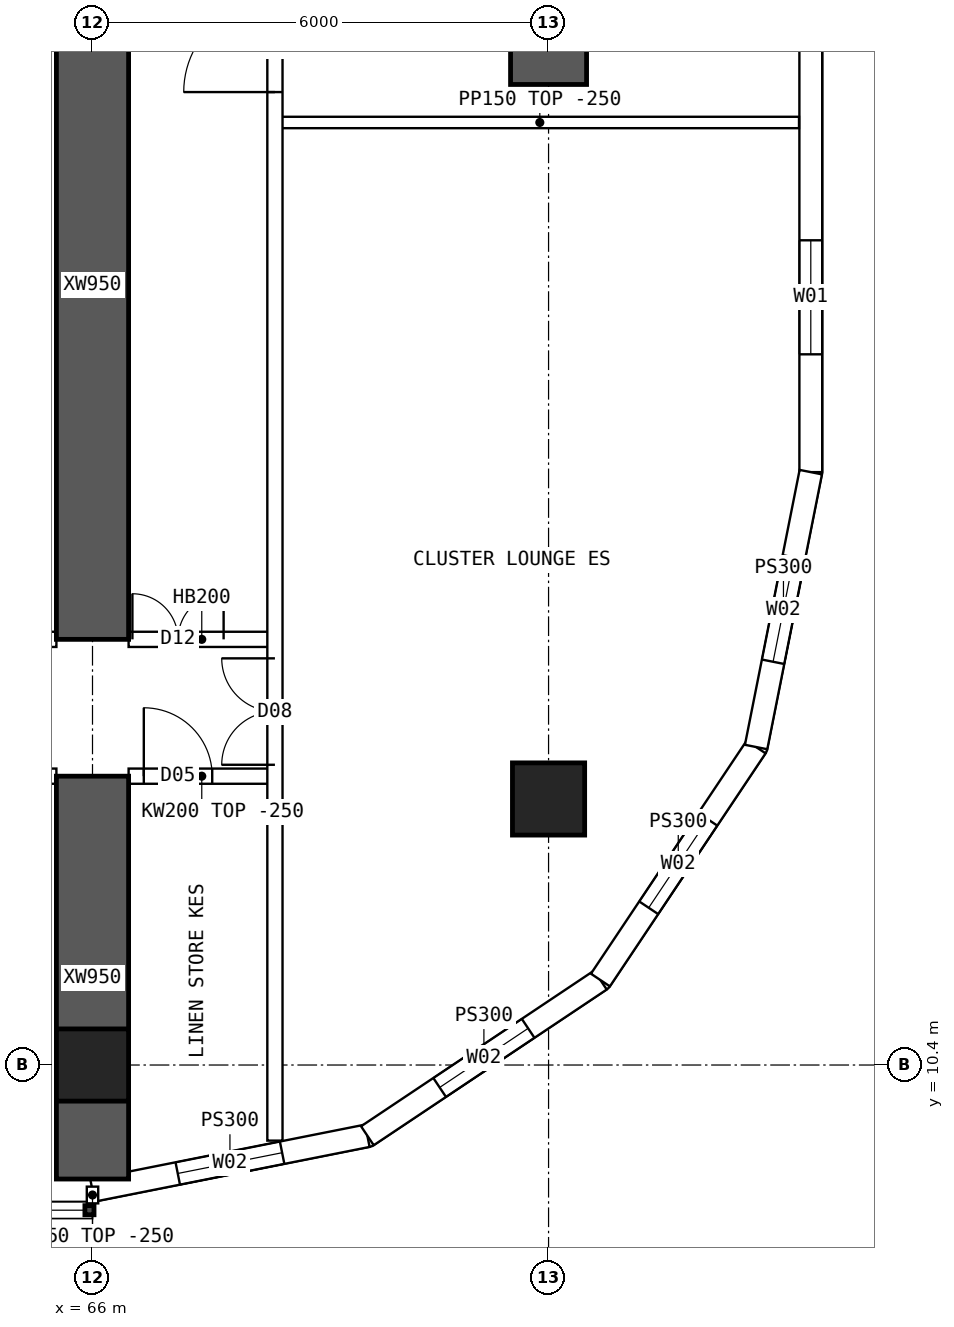
"""IFC4 building model, lengths in metres.
Left out: names, types, materials, properties, quantities, classifications, styles, units other than length and angle.
Written with IfcOpenShell. Run it as: python <this file> out.ifc"""

import sys

from ifc_helpers import new_model, si_unit, direction, frame, frame_2d, origin, origin_2d, place, context, subcontext, project, spatial, polyline, rectangle, hollow_rectangle, outline, extrude, element, fill, save


model = new_model("IFC4")
c1 = context("Model", 3, precision=1e-05, world=origin(), true_north=direction((0.0, 1.0)))
c2 = subcontext(c1, "Body", "Model", "MODEL_VIEW")
j1 = project(units=[si_unit("LENGTHUNIT", "METRE"), si_unit("PLANEANGLEUNIT", "RADIAN")], contexts=[c1])
p1 = place(None, origin())
s1 = spatial("IfcSite", under=j1, at=p1, CompositionType="ELEMENT")
p2 = place(p1, origin())
s2 = spatial("IfcBuilding", under=s1, at=p2, CompositionType="ELEMENT")
p3 = place(p2, frame((0.0, 0.0, 118.15)))
s3 = spatial("IfcBuildingStorey", under=s2, at=p3, CompositionType="ELEMENT", Elevation=118.15)
for number, where, z_axis, x_axis in (
    (1, (66.0, 10.4, 0.0), (0.0, 0.0, 1.0), (1.0, 0.0, 0.0)),
    (2, (72.0, 13.9, 0.0), (0.0, 0.0, 1.0), (1.0, 0.0, 0.0)),
):
    element("IfcColumn", number, at=place(p3, frame(where, z_axis=z_axis, x_axis=x_axis)), inside=s3, PredefinedType="COLUMN", context=c2, shape_type="SweptSolid", body=[
        extrude(hollow_rectangle(XDim=0.95, YDim=0.95, WallThickness=0.095, at=origin_2d()), origin(), (0.0, 0.0, 1.0), 3.75),
    ])
p4 = place(p3, frame((72.0, 23.3, 0.0), z_axis=(0.0, 0.0, 1.0), x_axis=(0.0, 1.0, 0.0)))
e3 = element("IfcWall", 3, at=p4, inside=s3, PredefinedType="SHEAR", context=c2, shape_type="SweptSolid", body=[
    extrude(rectangle(XDim=5.0, YDim=1.0, at=frame_2d((2.5, 0.0))), origin(), (0.0, 0.0, 1.0), 3.75),
])
p5 = place(p3, frame((66.0, 8.9, 0.0), z_axis=(0.0, 0.0, 1.0), x_axis=(0.0, 1.0, 0.0)))
e4 = element("IfcWall", 4, at=p5, inside=s3, PredefinedType="SHEAR", context=c2, shape_type="SweptSolid", body=[
    extrude(rectangle(XDim=5.3, YDim=0.95, at=frame_2d((2.65, 0.0))), origin(), (0.0, 0.0, 1.0), 3.75),
])
p6 = place(p3, frame((66.0, 16.0, 0.0), z_axis=(0.0, 0.0, 1.0), x_axis=(0.0, 1.0, 0.0)))
e5 = element("IfcWall", 5, at=p6, inside=s3, PredefinedType="SHEAR", context=c2, shape_type="SweptSolid", body=[
    extrude(rectangle(XDim=9.325, YDim=0.95, at=frame_2d((4.663, 0.0))), origin(), (0.0, 0.0, 1.0), 3.75),
])
p7 = place(p3, frame((75.45, 18.2, 0.0), z_axis=(0.0, 0.0, 1.0), x_axis=(0.0, 1.0, 0.0)))
e6 = element("IfcWall", 6, at=p7, inside=s3, PredefinedType="SOLIDWALL", context=c2, shape_type="SweptSolid", body=[
    extrude(outline(polyline([(-0.015, -0.15), (27.615, -0.15), (27.585, 0.15), (0.015, 0.15), (-0.015, -0.15)])), origin(), (0.0, 0.0, 1.0), 3.5),
])
p8 = place(p7, frame((1.55, 0.0, 0.9)))
e7 = element("IfcOpeningElement", 7, at=p8, cuts=e6, PredefinedType="OPENING", context=c2, shape_type="SweptSolid", body=[
    extrude(rectangle(XDim=1.5, YDim=2.0, at=frame_2d((0.75, 1.0))), frame((0.0, 0.16, 0.0), z_axis=(0.0, -1.0, 0.0), x_axis=(1.0, 0.0, 0.0)), (0.0, 0.0, 1.0), 0.32),
])
p9 = place(p7, frame((6.15, 0.0, 0.9)))
e8 = element("IfcOpeningElement", 8, at=p9, cuts=e6, PredefinedType="OPENING", context=c2, shape_type="SweptSolid", body=[
    extrude(rectangle(XDim=1.5, YDim=2.0, at=frame_2d((0.75, 1.0))), frame((0.0, 0.16, 0.0), z_axis=(0.0, -1.0, 0.0), x_axis=(1.0, 0.0, 0.0)), (0.0, 0.0, 1.0), 0.32),
])
p10 = place(p7, frame((10.75, 0.0, 0.9)))
e9 = element("IfcOpeningElement", 9, at=p10, cuts=e6, PredefinedType="OPENING", context=c2, shape_type="SweptSolid", body=[
    extrude(rectangle(XDim=1.5, YDim=2.0, at=frame_2d((0.75, 1.0))), frame((0.0, 0.16, 0.0), z_axis=(0.0, -1.0, 0.0), x_axis=(1.0, 0.0, 0.0)), (0.0, 0.0, 1.0), 0.32),
])
p11 = place(p7, frame((15.35, 0.0, 0.9)))
e10 = element("IfcOpeningElement", 10, at=p11, cuts=e6, PredefinedType="OPENING", context=c2, shape_type="SweptSolid", body=[
    extrude(rectangle(XDim=1.5, YDim=2.0, at=frame_2d((0.75, 1.0))), frame((0.0, 0.16, 0.0), z_axis=(0.0, -1.0, 0.0), x_axis=(1.0, 0.0, 0.0)), (0.0, 0.0, 1.0), 0.32),
])
p12 = place(p7, frame((19.95, 0.0, 0.9)))
e11 = element("IfcOpeningElement", 11, at=p12, cuts=e6, PredefinedType="OPENING", context=c2, shape_type="SweptSolid", body=[
    extrude(rectangle(XDim=1.5, YDim=2.0, at=frame_2d((0.75, 1.0))), frame((0.0, 0.16, 0.0), z_axis=(0.0, -1.0, 0.0), x_axis=(1.0, 0.0, 0.0)), (0.0, 0.0, 1.0), 0.32),
])
p13 = place(p7, frame((24.55, 0.0, 0.9)))
e12 = element("IfcOpeningElement", 12, at=p13, cuts=e6, PredefinedType="OPENING", context=c2, shape_type="SweptSolid", body=[
    extrude(rectangle(XDim=1.5, YDim=2.0, at=frame_2d((0.75, 1.0))), frame((0.0, 0.16, 0.0), z_axis=(0.0, -1.0, 0.0), x_axis=(1.0, 0.0, 0.0)), (0.0, 0.0, 1.0), 0.32),
])
p14 = place(p3, frame((66.0, 8.75, 0.0), z_axis=(0.0, 0.0, 1.0), x_axis=(0.980791473772, 0.195059183267, 0.0)))
e13 = element("IfcWall", 13, at=p14, inside=s3, PredefinedType="SOLIDWALL", context=c2, shape_type="SweptSolid", body=[
    extrude(outline(polyline([(-0.03, -0.15), (3.717, -0.15), (3.657, 0.15), (0.03, 0.15), (-0.03, -0.15)])), origin(), (0.0, 0.0, 1.0), 3.5),
])
p15 = place(p14, frame((1.144, 0.0, 0.9)))
e14 = element("IfcOpeningElement", 14, at=p15, cuts=e13, PredefinedType="OPENING", context=c2, shape_type="SweptSolid", body=[
    extrude(rectangle(XDim=1.4, YDim=1.8, at=frame_2d((0.7, 0.9))), frame((0.0, 0.16, 0.0), z_axis=(0.0, -1.0, 0.0), x_axis=(1.0, 0.0, 0.0)), (0.0, 0.0, 1.0), 0.32),
])
p16 = place(p3, frame((69.616, 9.469, 0.0), z_axis=(0.0, 0.0, 1.0), x_axis=(0.831448786846, 0.555601399253, 0.0)))
e15 = element("IfcWall", 15, at=p16, inside=s3, PredefinedType="SOLIDWALL", context=c2, shape_type="SweptSolid", body=[
    extrude(outline(polyline([(-0.03, -0.15), (3.717, -0.15), (3.657, 0.15), (0.03, 0.15), (-0.03, -0.15)])), origin(), (0.0, 0.0, 1.0), 3.5),
])
p17 = place(p16, frame((1.144, 0.0, 0.9)))
e16 = element("IfcOpeningElement", 16, at=p17, cuts=e15, PredefinedType="OPENING", context=c2, shape_type="SweptSolid", body=[
    extrude(rectangle(XDim=1.4, YDim=1.8, at=frame_2d((0.7, 0.9))), frame((0.0, 0.16, 0.0), z_axis=(0.0, -1.0, 0.0), x_axis=(1.0, 0.0, 0.0)), (0.0, 0.0, 1.0), 0.32),
])
p18 = place(p3, frame((72.682, 11.518, 0.0), z_axis=(0.0, 0.0, 1.0), x_axis=(0.555601399253, 0.831448786846, 0.0)))
e17 = element("IfcWall", 17, at=p18, inside=s3, PredefinedType="SOLIDWALL", context=c2, shape_type="SweptSolid", body=[
    extrude(outline(polyline([(-0.03, -0.15), (3.717, -0.15), (3.657, 0.15), (0.03, 0.15), (-0.03, -0.15)])), origin(), (0.0, 0.0, 1.0), 3.5),
])
p19 = place(p18, frame((1.144, 0.0, 0.9)))
e18 = element("IfcOpeningElement", 18, at=p19, cuts=e17, PredefinedType="OPENING", context=c2, shape_type="SweptSolid", body=[
    extrude(rectangle(XDim=1.4, YDim=1.8, at=frame_2d((0.7, 0.9))), frame((0.0, 0.16, 0.0), z_axis=(0.0, -1.0, 0.0), x_axis=(1.0, 0.0, 0.0)), (0.0, 0.0, 1.0), 0.32),
])
p20 = place(p3, frame((74.731, 14.583, 0.0), z_axis=(0.0, 0.0, 1.0), x_axis=(0.195059183267, 0.980791473772, 0.0)))
e19 = element("IfcWall", 19, at=p20, inside=s3, PredefinedType="SOLIDWALL", context=c2, shape_type="SweptSolid", body=[
    extrude(outline(polyline([(-0.03, -0.15), (3.702, -0.15), (3.672, 0.15), (0.03, 0.15), (-0.03, -0.15)])), origin(), (0.0, 0.0, 1.0), 3.5),
])
p21 = place(p20, frame((1.144, 0.0, 0.9)))
e20 = element("IfcOpeningElement", 20, at=p21, cuts=e19, PredefinedType="OPENING", context=c2, shape_type="SweptSolid", body=[
    extrude(rectangle(XDim=1.4, YDim=1.8, at=frame_2d((0.7, 0.9))), frame((0.0, 0.16, 0.0), z_axis=(0.0, -1.0, 0.0), x_axis=(1.0, 0.0, 0.0)), (0.0, 0.0, 1.0), 0.32),
])
p22 = place(p3, frame((60.475, 14.2, 0.0), z_axis=(0.0, 0.0, 1.0), x_axis=(1.0, 0.0, 0.0)))
e21 = element("IfcWall", 21, at=p22, inside=s3, PredefinedType="SOLIDWALL", context=c2, shape_type="SweptSolid", body=[
    extrude(outline(polyline([(0.0, 0.0), (5.05, 0.0), (5.05, 3.1), (0.0, 3.1), (0.0, 0.0)])), frame((0.0, 0.1, 0.0), z_axis=(0.0, -1.0, 0.0), x_axis=(1.0, 0.0, 0.0)), (0.0, 0.0, 1.0), 0.2),
])
p23 = place(p22, frame((0.1, 0.0, 0.0)))
e22 = element("IfcOpeningElement", 22, at=p23, cuts=e21, PredefinedType="OPENING", context=c2, shape_type="SweptSolid", body=[
    extrude(rectangle(XDim=0.9, YDim=2.1, at=frame_2d((0.45, 1.05))), frame((0.0, 0.11, 0.0), z_axis=(0.0, -1.0, 0.0), x_axis=(1.0, 0.0, 0.0)), (0.0, 0.0, 1.0), 0.22),
])
p24 = place(p22, frame((3.9, 0.0, 0.0)))
e23 = element("IfcOpeningElement", 23, at=p24, cuts=e21, PredefinedType="OPENING", context=c2, shape_type="SweptSolid", body=[
    extrude(rectangle(XDim=0.9, YDim=2.1, at=frame_2d((0.45, 1.05))), frame((0.0, 0.11, 0.0), z_axis=(0.0, -1.0, 0.0), x_axis=(1.0, 0.0, 0.0)), (0.0, 0.0, 1.0), 0.22),
])
p25 = place(p3, frame((60.475, 16.0, 0.0), z_axis=(0.0, 0.0, 1.0), x_axis=(1.0, 0.0, 0.0)))
e24 = element("IfcWall", 24, at=p25, inside=s3, PredefinedType="SOLIDWALL", context=c2, shape_type="SweptSolid", body=[
    extrude(rectangle(XDim=5.05, YDim=0.2, at=frame_2d((2.525, 0.0))), origin(), (0.0, 0.0, 1.0), 3.5),
])
p26 = place(p25, frame((0.15, 0.0, 0.0)))
e25 = element("IfcOpeningElement", 25, at=p26, cuts=e24, PredefinedType="OPENING", context=c2, shape_type="SweptSolid", body=[
    extrude(rectangle(XDim=0.9, YDim=2.1, at=frame_2d((0.45, 1.05))), frame((0.0, 0.11, 0.0), z_axis=(0.0, -1.0, 0.0), x_axis=(1.0, 0.0, 0.0)), (0.0, 0.0, 1.0), 0.22),
])
p27 = place(p25, frame((3.235, 0.0, 0.0)))
e26 = element("IfcOpeningElement", 26, at=p27, cuts=e24, PredefinedType="OPENING", context=c2, shape_type="SweptSolid", body=[
    extrude(rectangle(XDim=0.9, YDim=2.1, at=frame_2d((0.45, 1.05))), frame((0.0, 0.11, 0.0), z_axis=(0.0, -1.0, 0.0), x_axis=(1.0, 0.0, 0.0)), (0.0, 0.0, 1.0), 0.22),
])
p28 = place(p3, frame((66.475, 14.2, 0.0), z_axis=(0.0, 0.0, 1.0), x_axis=(1.0, 0.0, 0.0)))
e27 = element("IfcWall", 27, at=p28, inside=s3, PredefinedType="SOLIDWALL", context=c2, shape_type="SweptSolid", body=[
    extrude(rectangle(XDim=1.925, YDim=0.2, at=frame_2d((0.962, 0.0))), origin(), (0.0, 0.0, 1.0), 3.5),
])
p29 = place(p28, frame((0.2, 0.0, 0.0)))
e28 = element("IfcOpeningElement", 28, at=p29, cuts=e27, PredefinedType="OPENING", context=c2, shape_type="SweptSolid", body=[
    extrude(rectangle(XDim=0.9, YDim=2.1, at=frame_2d((0.45, 1.05))), frame((0.0, 0.11, 0.0), z_axis=(0.0, -1.0, 0.0), x_axis=(1.0, 0.0, 0.0)), (0.0, 0.0, 1.0), 0.22),
])
p30 = place(p3, frame((66.475, 16.0, 0.0), z_axis=(0.0, 0.0, 1.0), x_axis=(1.0, 0.0, 0.0)))
e29 = element("IfcWall", 29, at=p30, inside=s3, PredefinedType="SOLIDWALL", context=c2, shape_type="SweptSolid", body=[
    extrude(rectangle(XDim=1.925, YDim=0.2, at=frame_2d((0.962, 0.0))), origin(), (0.0, 0.0, 1.0), 3.5),
])
p31 = place(p30, frame((0.05, 0.0, 0.0)))
e30 = element("IfcOpeningElement", 30, at=p31, cuts=e29, PredefinedType="OPENING", context=c2, shape_type="SweptSolid", body=[
    extrude(rectangle(XDim=1.2, YDim=2.1, at=frame_2d((0.6, 1.05))), frame((0.0, 0.11, 0.0), z_axis=(0.0, -1.0, 0.0), x_axis=(1.0, 0.0, 0.0)), (0.0, 0.0, 1.0), 0.22),
])
p32 = place(p3, frame((68.4, 9.405, 0.0), z_axis=(0.0, 0.0, 1.0), x_axis=(0.0, 1.0, 0.0)))
e31 = element("IfcWall", 31, at=p32, inside=s3, PredefinedType="SOLIDWALL", context=c2, shape_type="SweptSolid", body=[
    extrude(rectangle(XDim=45.189, YDim=0.2, at=frame_2d((22.595, 0.0))), origin(), (0.0, 0.0, 1.0), 3.5),
])
p33 = place(p32, frame((13.795, 0.0, 0.0)))
e32 = element("IfcOpeningElement", 32, at=p33, cuts=e31, PredefinedType="OPENING", context=c2, shape_type="SweptSolid", body=[
    extrude(rectangle(XDim=1.2, YDim=2.1, at=frame_2d((0.6, 1.05))), frame((0.0, 0.11, 0.0), z_axis=(0.0, -1.0, 0.0), x_axis=(1.0, 0.0, 0.0)), (0.0, 0.0, 1.0), 0.22),
])
p34 = place(p32, frame((4.945, 0.0, 0.0)))
e33 = element("IfcOpeningElement", 33, at=p34, cuts=e31, PredefinedType="OPENING", context=c2, shape_type="SweptSolid", body=[
    extrude(rectangle(XDim=1.4, YDim=2.1, at=frame_2d((0.7, 1.05))), frame((0.0, 0.11, 0.0), z_axis=(0.0, -1.0, 0.0), x_axis=(1.0, 0.0, 0.0)), (0.0, 0.0, 1.0), 0.22),
])
p35 = place(p32, frame((38.745, 0.0, 0.0)))
e34 = element("IfcOpeningElement", 34, at=p35, cuts=e31, PredefinedType="OPENING", context=c2, shape_type="SweptSolid", body=[
    extrude(rectangle(XDim=1.4, YDim=2.1, at=frame_2d((0.7, 1.05))), frame((0.0, 0.11, 0.0), z_axis=(0.0, -1.0, 0.0), x_axis=(1.0, 0.0, 0.0)), (0.0, 0.0, 1.0), 0.22),
])
p36 = place(p3, frame((68.475, 22.8, 0.0), z_axis=(0.0, 0.0, 1.0), x_axis=(1.0, 0.0, 0.0)))
e35 = element("IfcWall", 35, at=p36, inside=s3, PredefinedType="PARTITIONING", context=c2, shape_type="SweptSolid", body=[
    extrude(outline(polyline([(0.0, 0.0), (6.82, 0.0), (6.82, 3.5), (3.827, 3.5), (3.825, 3.05), (3.227, 3.05), (3.225, 3.5), (0.0, 3.5), (0.0, 0.0)])), frame((0.0, 0.075, 0.0), z_axis=(0.0, -1.0, 0.0), x_axis=(1.0, 0.0, 0.0)), (0.0, 0.0, 1.0), 0.15),
])
p37 = place(p3, frame((66.0, 8.8, 0.0), z_axis=(0.0, 0.0, 1.0), x_axis=(0.0, -1.0, 0.0)))
e36 = element("IfcWall", 36, at=p37, inside=s3, PredefinedType="PARTITIONING", context=c2, shape_type="SweptSolid", body=[
    extrude(rectangle(XDim=0.22, YDim=0.15, at=frame_2d((0.11, 0.0))), origin(), (0.0, 0.0, 1.0), 3.5),
])
p38 = place(p8, origin())
e37 = element("IfcWindow", 37, at=p38, inside=s3, PartitioningType="SINGLE_PANEL", PredefinedType="WINDOW", context=c2, shape_type="SweptSolid", body=[
    extrude(rectangle(XDim=1.5, YDim=2.0, at=frame_2d((0.75, 1.0))), frame((0.0, 0.03, 0.0), z_axis=(0.0, -1.0, 0.0), x_axis=(1.0, 0.0, 0.0)), (0.0, 0.0, 1.0), 0.06),
])
fill(e7, e37)
p39 = place(p15, origin())
e38 = element("IfcWindow", 38, at=p39, inside=s3, PartitioningType="SINGLE_PANEL", PredefinedType="WINDOW", context=c2, shape_type="SweptSolid", body=[
    extrude(rectangle(XDim=1.4, YDim=1.8, at=frame_2d((0.7, 0.9))), frame((0.0, 0.03, 0.0), z_axis=(0.0, -1.0, 0.0), x_axis=(1.0, 0.0, 0.0)), (0.0, 0.0, 1.0), 0.06),
])
fill(e14, e38)
p40 = place(p17, origin())
e39 = element("IfcWindow", 39, at=p40, inside=s3, PartitioningType="SINGLE_PANEL", PredefinedType="WINDOW", context=c2, shape_type="SweptSolid", body=[
    extrude(rectangle(XDim=1.4, YDim=1.8, at=frame_2d((0.7, 0.9))), frame((0.0, 0.03, 0.0), z_axis=(0.0, -1.0, 0.0), x_axis=(1.0, 0.0, 0.0)), (0.0, 0.0, 1.0), 0.06),
])
fill(e16, e39)
p41 = place(p19, origin())
e40 = element("IfcWindow", 40, at=p41, inside=s3, PartitioningType="SINGLE_PANEL", PredefinedType="WINDOW", context=c2, shape_type="SweptSolid", body=[
    extrude(rectangle(XDim=1.4, YDim=1.8, at=frame_2d((0.7, 0.9))), frame((0.0, 0.03, 0.0), z_axis=(0.0, -1.0, 0.0), x_axis=(1.0, 0.0, 0.0)), (0.0, 0.0, 1.0), 0.06),
])
fill(e18, e40)
p42 = place(p21, origin())
e41 = element("IfcWindow", 41, at=p42, inside=s3, PartitioningType="SINGLE_PANEL", PredefinedType="WINDOW", context=c2, shape_type="SweptSolid", body=[
    extrude(rectangle(XDim=1.4, YDim=1.8, at=frame_2d((0.7, 0.9))), frame((0.0, 0.03, 0.0), z_axis=(0.0, -1.0, 0.0), x_axis=(1.0, 0.0, 0.0)), (0.0, 0.0, 1.0), 0.06),
])
fill(e20, e41)
p43 = place(p31, origin())
e42 = element("IfcDoor", 42, at=p43, inside=s3, OperationType="DOUBLE_DOOR_SINGLE_SWING", PredefinedType="DOOR", context=c2, shape_type="SweptSolid", body=[
    extrude(rectangle(XDim=1.2, YDim=2.1, at=frame_2d((0.6, 1.05))), frame((0.0, 0.025, 0.0), z_axis=(0.0, -1.0, 0.0), x_axis=(1.0, 0.0, 0.0)), (0.0, 0.0, 1.0), 0.05),
])
fill(e30, e42)
p44 = place(p33, origin())
e43 = element("IfcDoor", 43, at=p44, inside=s3, OperationType="SINGLE_SWING_LEFT", PredefinedType="DOOR", context=c2, shape_type="SweptSolid", body=[
    extrude(rectangle(XDim=1.2, YDim=2.1, at=frame_2d((0.6, 1.05))), frame((0.0, 0.025, 0.0), z_axis=(0.0, -1.0, 0.0), x_axis=(1.0, 0.0, 0.0)), (0.0, 0.0, 1.0), 0.05),
])
fill(e32, e43)
p45 = place(p34, origin())
e44 = element("IfcDoor", 44, at=p45, inside=s3, OperationType="DOUBLE_DOOR_SINGLE_SWING", PredefinedType="DOOR", context=c2, shape_type="SweptSolid", body=[
    extrude(rectangle(XDim=1.4, YDim=2.1, at=frame_2d((0.7, 1.05))), frame((0.0, 0.025, 0.0), z_axis=(0.0, -1.0, 0.0), x_axis=(1.0, 0.0, 0.0)), (0.0, 0.0, 1.0), 0.05),
])
fill(e33, e44)
p46 = place(p29, origin())
e45 = element("IfcDoor", 45, at=p46, inside=s3, OperationType="SINGLE_SWING_LEFT", PredefinedType="DOOR", context=c2, shape_type="SweptSolid", body=[
    extrude(rectangle(XDim=0.9, YDim=2.1, at=frame_2d((0.45, 1.05))), frame((0.0, 0.025, 0.0), z_axis=(0.0, -1.0, 0.0), x_axis=(1.0, 0.0, 0.0)), (0.0, 0.0, 1.0), 0.05),
])
fill(e28, e45)
save(model, sys.argv[1])
